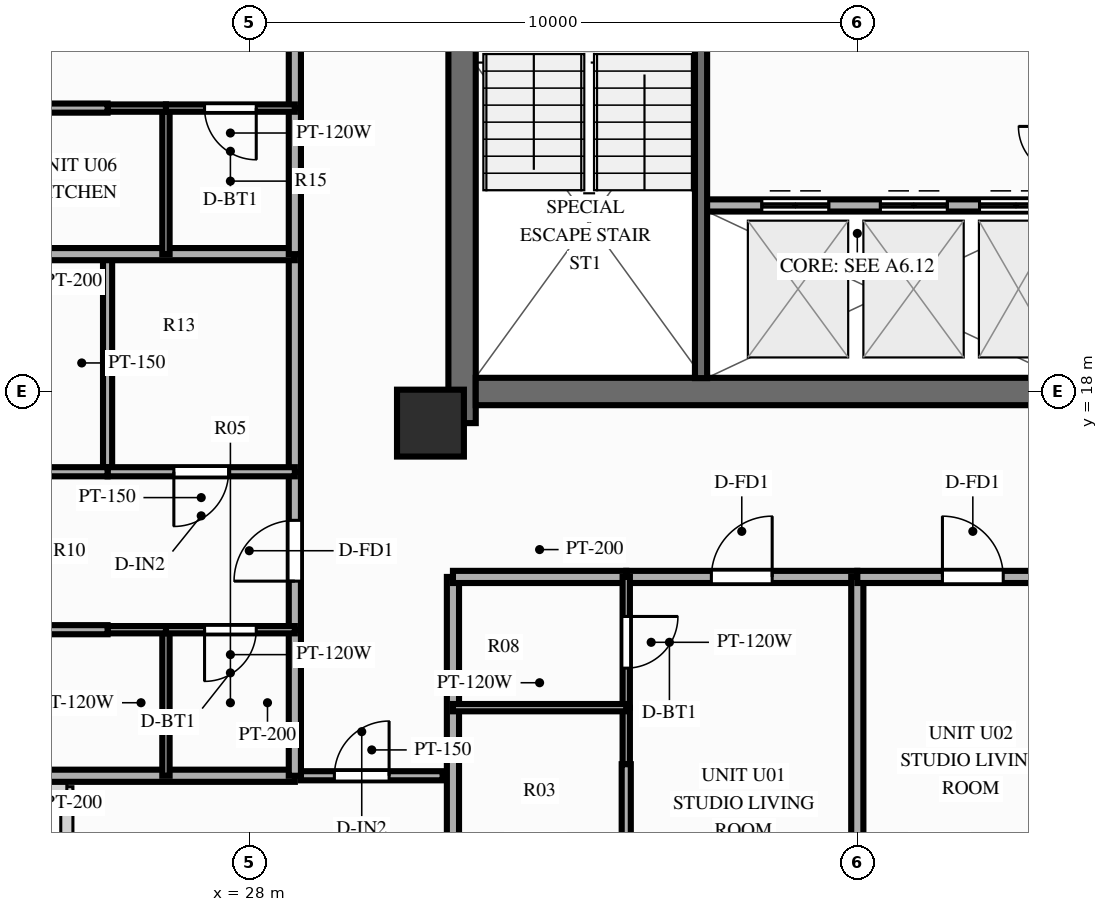
"""IFC4 building model, lengths in metres.
Left out: names, types, materials, properties, quantities, classifications, styles, units other than length and angle.
Written with IfcOpenShell. Run it as: python <this file> out.ifc"""

import sys

from ifc_helpers import new_model, si_unit, direction, frame, frame_2d, origin, origin_2d, place, context, subcontext, project, spatial, rectangle, extrude, source, transform, mapped, element, fill, save


model = new_model("IFC4")
c1 = context("Model", 3, precision=1e-05, world=origin(), true_north=direction((0.0, 1.0)))
c2 = subcontext(c1, "Body", "Model", "MODEL_VIEW")
j1 = project(units=[si_unit("LENGTHUNIT", "METRE"), si_unit("PLANEANGLEUNIT", "RADIAN")], contexts=[c1])
p1 = place(None, origin())
s1 = spatial("IfcSite", under=j1, at=p1, CompositionType="ELEMENT")
p2 = place(p1, origin())
s2 = spatial("IfcBuilding", under=s1, at=p2, CompositionType="ELEMENT")
p3 = place(p2, frame((0.0, 0.0, 196.6)))
s3 = spatial("IfcBuildingStorey", under=s2, at=p3, CompositionType="ELEMENT", Elevation=196.6)
p4 = place(p3, frame((31.5, 17.48, 0.0), z_axis=(0.0, 0.0, 1.0), x_axis=(0.0, 1.0, 0.0)))
e1 = element("IfcWall", 1, at=p4, inside=s3, PredefinedType="SHEAR", context=c2, shape_type="SweptSolid", body=[
    extrude(rectangle(XDim=19.04, YDim=0.45, at=frame_2d((9.52, 0.0))), origin(), (0.0, 0.0, 1.0), 3.0),
])
p5 = place(p4, frame((6.32, 0.0, 0.0)))
e2 = element("IfcOpeningElement", 2, at=p5, cuts=e1, PredefinedType="OPENING", context=c2, shape_type="SweptSolid", body=[
    extrude(rectangle(XDim=1.1, YDim=2.15, at=frame_2d((0.55, 1.075))), frame((0.0, 0.237, 0.0), z_axis=(0.0, -1.0, 0.0), x_axis=(1.0, 0.0, 0.0)), (0.0, 0.0, 1.0), 0.474),
])
p6 = place(p3, frame((31.725, 18.0, 0.0), z_axis=(0.0, 0.0, 1.0), x_axis=(1.0, 0.0, 0.0)))
e3 = element("IfcWall", 3, at=p6, inside=s3, PredefinedType="SHEAR", context=c2, shape_type="SweptSolid", body=[
    extrude(rectangle(XDim=12.55, YDim=0.45, at=frame_2d((6.275, 0.0))), origin(), (0.0, 0.0, 1.0), 3.0),
])
m1 = source(origin(), c2, "Body", "SweptSolid", [
    extrude(rectangle(XDim=1.1, YDim=1.1, at=origin_2d()), origin(), (0.0, 0.0, 1.0), 3.0),
])
p7 = place(p3, frame((30.98, 17.48, 0.0), z_axis=(0.0, 0.0, 1.0), x_axis=(1.0, 0.0, 0.0)))
e4 = element("IfcColumn", 4, at=p7, inside=s3, PredefinedType="COLUMN", context=c2, shape_type="MappedRepresentation", body=[
    mapped(m1, transform((0.0, 0.0, 0.0), scale=1.0)),
])
p8 = place(p3, frame((35.43, 21.06, 0.0), z_axis=(0.0, 0.0, 1.0), x_axis=(1.0, 0.0, 0.0)))
e5 = element("IfcWall", 5, at=p8, inside=s3, PredefinedType="PARTITIONING", context=c2, shape_type="SweptSolid", body=[
    extrude(rectangle(XDim=6.02, YDim=0.2, at=frame_2d((3.01, 0.0))), origin(), (0.0, 0.0, 1.0), 2.79),
])
p9 = place(p8, frame((1.0, 0.0, 0.0)))
e6 = element("IfcOpeningElement", 6, at=p9, cuts=e5, PredefinedType="OPENING", context=c2, shape_type="SweptSolid", body=[
    extrude(rectangle(XDim=1.1, YDim=2.15, at=frame_2d((0.55, 1.075))), frame((0.0, 0.112, 0.0), z_axis=(0.0, -1.0, 0.0), x_axis=(1.0, 0.0, 0.0)), (0.0, 0.0, 1.0), 0.224),
])
p10 = place(p8, frame((2.95, 0.0, 0.0)))
e7 = element("IfcOpeningElement", 7, at=p10, cuts=e5, PredefinedType="OPENING", context=c2, shape_type="SweptSolid", body=[
    extrude(rectangle(XDim=1.1, YDim=2.15, at=frame_2d((0.55, 1.075))), frame((0.0, 0.112, 0.0), z_axis=(0.0, -1.0, 0.0), x_axis=(1.0, 0.0, 0.0)), (0.0, 0.0, 1.0), 0.224),
])
p11 = place(p8, frame((4.58, 0.0, 0.0)))
e8 = element("IfcOpeningElement", 8, at=p11, cuts=e5, PredefinedType="OPENING", context=c2, shape_type="SweptSolid", body=[
    extrude(rectangle(XDim=1.2, YDim=2.15, at=frame_2d((0.6, 1.075))), frame((0.0, 0.112, 0.0), z_axis=(0.0, -1.0, 0.0), x_axis=(1.0, 0.0, 0.0)), (0.0, 0.0, 1.0), 0.224),
])
p12 = place(p3, frame((35.43, 18.22, 0.0), z_axis=(0.0, 0.0, 1.0), x_axis=(0.0, 1.0, 0.0)))
e9 = element("IfcWall", 9, at=p12, inside=s3, PredefinedType="SOLIDWALL", context=c2, shape_type="SweptSolid", body=[
    extrude(rectangle(XDim=7.22, YDim=0.2, at=frame_2d((3.61, 0.0))), origin(), (0.0, 0.0, 1.0), 2.79),
])
p13 = place(p12, frame((6.68, 0.0, 0.0), z_axis=(0.0, 0.0, 1.0), x_axis=(-1.0, 0.0, 0.0)))
e10 = element("IfcOpeningElement", 10, at=p13, cuts=e9, PredefinedType="OPENING", context=c2, shape_type="SweptSolid", body=[
    extrude(rectangle(XDim=1.1, YDim=2.15, at=frame_2d((0.55, 1.075))), frame((0.0, 0.112, 0.0), z_axis=(0.0, -1.0, 0.0), x_axis=(1.0, 0.0, 0.0)), (0.0, 0.0, 1.0), 0.224),
])
p14 = place(p3, frame((28.85, 11.68, 0.0), z_axis=(0.0, 0.0, 1.0), x_axis=(1.0, 0.0, 0.0)))
e11 = element("IfcWall", 11, at=p14, inside=s3, PredefinedType="PARTITIONING", context=c2, shape_type="SweptSolid", body=[
    extrude(rectangle(XDim=2.33, YDim=0.15, at=frame_2d((1.165, 0.0))), origin(), (0.0, 0.0, 1.0), 2.79),
])
p15 = place(p14, frame((0.55, 0.0, 0.0)))
e12 = element("IfcOpeningElement", 12, at=p15, cuts=e11, PredefinedType="OPENING", context=c2, shape_type="SweptSolid", body=[
    extrude(rectangle(XDim=0.9, YDim=2.1, at=frame_2d((0.45, 1.05))), frame((0.0, 0.087, 0.0), z_axis=(0.0, -1.0, 0.0), x_axis=(1.0, 0.0, 0.0)), (0.0, 0.0, 1.0), 0.174),
])
p16 = place(p3, frame((31.35, 14.95, 0.0), z_axis=(0.0, 0.0, 1.0), x_axis=(0.0, -1.0, 0.0)))
e13 = element("IfcWall", 13, at=p16, inside=s3, PredefinedType="PARTITIONING", context=c2, shape_type="SweptSolid", body=[
    extrude(rectangle(XDim=8.8, YDim=0.2, at=frame_2d((4.4, 0.0))), origin(), (0.0, 0.0, 1.0), 2.39),
])
p17 = place(p3, frame((31.35, 14.95, 0.0), z_axis=(0.0, 0.0, 1.0), x_axis=(1.0, 0.0, 0.0)))
e14 = element("IfcWall", 14, at=p17, inside=s3, PredefinedType="PARTITIONING", context=c2, shape_type="SweptSolid", body=[
    extrude(rectangle(XDim=2.85, YDim=0.2, at=frame_2d((1.425, 0.0))), origin(), (0.0, 0.0, 1.0), 2.79),
])
p18 = place(p3, frame((34.2, 14.95, 0.0), z_axis=(0.0, 0.0, 1.0), x_axis=(1.0, 0.0, 0.0)))
e15 = element("IfcWall", 15, at=p18, inside=s3, PredefinedType="PARTITIONING", context=c2, shape_type="SweptSolid", body=[
    extrude(rectangle(XDim=3.8, YDim=0.2, at=frame_2d((1.9, 0.0))), origin(), (0.0, 0.0, 1.0), 2.79),
])
p19 = place(p18, frame((1.4, 0.0, 0.0)))
e16 = element("IfcOpeningElement", 16, at=p19, cuts=e15, PredefinedType="OPENING", context=c2, shape_type="SweptSolid", body=[
    extrude(rectangle(XDim=1.0, YDim=2.15, at=frame_2d((0.5, 1.075))), frame((0.0, 0.112, 0.0), z_axis=(0.0, -1.0, 0.0), x_axis=(1.0, 0.0, 0.0)), (0.0, 0.0, 1.0), 0.224),
])
p20 = place(p3, frame((34.2, 14.95, 0.0), z_axis=(0.0, 0.0, 1.0), x_axis=(0.0, -1.0, 0.0)))
e17 = element("IfcWall", 17, at=p20, inside=s3, PredefinedType="PARTITIONING", context=c2, shape_type="SweptSolid", body=[
    extrude(rectangle(XDim=2.15, YDim=0.12, at=frame_2d((1.075, 0.0))), origin(), (0.0, 0.0, 1.0), 2.79),
])
p21 = place(p20, frame((0.65, 0.0, 0.0)))
e18 = element("IfcOpeningElement", 18, at=p21, cuts=e17, PredefinedType="OPENING", context=c2, shape_type="SweptSolid", body=[
    extrude(rectangle(XDim=0.85, YDim=2.05, at=frame_2d((0.425, 1.025))), frame((0.0, 0.072, 0.0), z_axis=(0.0, -1.0, 0.0), x_axis=(1.0, 0.0, 0.0)), (0.0, 0.0, 1.0), 0.144),
])
p22 = place(p3, frame((34.2, 12.8, 0.0), z_axis=(0.0, 0.0, 1.0), x_axis=(0.0, -1.0, 0.0)))
e19 = element("IfcWall", 19, at=p22, inside=s3, PredefinedType="PARTITIONING", context=c2, shape_type="SweptSolid", body=[
    extrude(rectangle(XDim=0.93, YDim=0.12, at=frame_2d((0.465, 0.0))), origin(), (0.0, 0.0, 1.0), 2.79),
])
p23 = place(p3, frame((31.35, 12.8, 0.0), z_axis=(0.0, 0.0, 1.0), x_axis=(1.0, 0.0, 0.0)))
e20 = element("IfcWall", 20, at=p23, inside=s3, PredefinedType="PARTITIONING", context=c2, shape_type="SweptSolid", body=[
    extrude(rectangle(XDim=2.85, YDim=0.12, at=frame_2d((1.425, 0.0))), origin(), (0.0, 0.0, 1.0), 2.79),
])
p24 = place(p3, frame((34.2, 11.87, 0.0), z_axis=(0.0, 0.0, 1.0), x_axis=(0.0, -1.0, 0.0)))
e21 = element("IfcWall", 21, at=p24, inside=s3, PredefinedType="PARTITIONING", context=c2, shape_type="SweptSolid", body=[
    extrude(rectangle(XDim=5.72, YDim=0.15, at=frame_2d((2.86, 0.0))), origin(), (0.0, 0.0, 1.0), 2.79),
])
p25 = place(p24, frame((2.229, 0.0, 0.0)))
e22 = element("IfcOpeningElement", 22, at=p25, cuts=e21, PredefinedType="OPENING", context=c2, shape_type="SweptSolid", body=[
    extrude(rectangle(XDim=0.9, YDim=2.1, at=frame_2d((0.45, 1.05))), frame((0.0, 0.087, 0.0), z_axis=(0.0, -1.0, 0.0), x_axis=(1.0, 0.0, 0.0)), (0.0, 0.0, 1.0), 0.174),
])
p26 = place(p3, frame((38.0, 14.95, 0.0), z_axis=(0.0, 0.0, 1.0), x_axis=(0.0, -1.0, 0.0)))
e23 = element("IfcWall", 23, at=p26, inside=s3, PredefinedType="PARTITIONING", context=c2, shape_type="SweptSolid", body=[
    extrude(rectangle(XDim=8.8, YDim=0.2, at=frame_2d((4.4, 0.0))), origin(), (0.0, 0.0, 1.0), 2.79),
])
p27 = place(p3, frame((38.0, 14.95, 0.0), z_axis=(0.0, 0.0, 1.0), x_axis=(1.0, 0.0, 0.0)))
e24 = element("IfcWall", 24, at=p27, inside=s3, PredefinedType="PARTITIONING", context=c2, shape_type="SweptSolid", body=[
    extrude(rectangle(XDim=3.8, YDim=0.2, at=frame_2d((1.9, 0.0))), origin(), (0.0, 0.0, 1.0), 2.79),
])
p28 = place(p27, frame((1.4, 0.0, 0.0)))
e25 = element("IfcOpeningElement", 25, at=p28, cuts=e24, PredefinedType="OPENING", context=c2, shape_type="SweptSolid", body=[
    extrude(rectangle(XDim=1.0, YDim=2.15, at=frame_2d((0.5, 1.075))), frame((0.0, 0.112, 0.0), z_axis=(0.0, -1.0, 0.0), x_axis=(1.0, 0.0, 0.0)), (0.0, 0.0, 1.0), 0.224),
])
p29 = place(p3, frame((28.75, 11.68, 0.0), z_axis=(0.0, 0.0, 1.0), x_axis=(-1.0, 0.0, 0.0)))
e26 = element("IfcWall", 26, at=p29, inside=s3, PredefinedType="PARTITIONING", context=c2, shape_type="SweptSolid", body=[
    extrude(rectangle(XDim=9.1, YDim=0.2, at=frame_2d((4.55, 0.0))), origin(), (0.0, 0.0, 1.0), 2.79),
])
p30 = place(p3, frame((28.75, 11.68, 0.0), z_axis=(0.0, 0.0, 1.0), x_axis=(0.0, 1.0, 0.0)))
e27 = element("IfcWall", 27, at=p30, inside=s3, PredefinedType="PARTITIONING", context=c2, shape_type="SweptSolid", body=[
    extrude(rectangle(XDim=2.402, YDim=0.2, at=frame_2d((1.201, 0.0))), origin(), (0.0, 0.0, 1.0), 2.79),
])
p31 = place(p3, frame((28.75, 14.082, 0.0), z_axis=(0.0, 0.0, 1.0), x_axis=(0.0, 1.0, 0.0)))
e28 = element("IfcWall", 28, at=p31, inside=s3, PredefinedType="PARTITIONING", context=c2, shape_type="SweptSolid", body=[
    extrude(rectangle(XDim=2.598, YDim=0.2, at=frame_2d((1.299, 0.0))), origin(), (0.0, 0.0, 1.0), 2.79),
])
p32 = place(p31, frame((0.799, 0.0, 0.0)))
e29 = element("IfcOpeningElement", 29, at=p32, cuts=e28, PredefinedType="OPENING", context=c2, shape_type="SweptSolid", body=[
    extrude(rectangle(XDim=1.0, YDim=2.15, at=frame_2d((0.5, 1.075))), frame((0.0, 0.112, 0.0), z_axis=(0.0, -1.0, 0.0), x_axis=(1.0, 0.0, 0.0)), (0.0, 0.0, 1.0), 0.224),
])
p33 = place(p3, frame((28.75, 16.68, 0.0), z_axis=(0.0, 0.0, 1.0), x_axis=(0.0, 1.0, 0.0)))
e30 = element("IfcWall", 30, at=p33, inside=s3, PredefinedType="PARTITIONING", context=c2, shape_type="SweptSolid", body=[
    extrude(rectangle(XDim=3.579, YDim=0.2, at=frame_2d((1.79, 0.0))), origin(), (0.0, 0.0, 1.0), 2.79),
])
p34 = place(p3, frame((26.63, 11.68, 0.0), z_axis=(0.0, 0.0, 1.0), x_axis=(0.0, 1.0, 0.0)))
e31 = element("IfcWall", 31, at=p34, inside=s3, PredefinedType="PARTITIONING", context=c2, shape_type="SweptSolid", body=[
    extrude(rectangle(XDim=2.402, YDim=0.12, at=frame_2d((1.201, 0.0))), origin(), (0.0, 0.0, 1.0), 2.79),
])
p35 = place(p3, frame((25.67, 16.68, 0.0), z_axis=(0.0, 0.0, 1.0), x_axis=(0.0, 1.0, 0.0)))
e32 = element("IfcWall", 32, at=p35, inside=s3, PredefinedType="PARTITIONING", context=c2, shape_type="SweptSolid", body=[
    extrude(rectangle(XDim=3.579, YDim=0.15, at=frame_2d((1.79, 0.0))), origin(), (0.0, 0.0, 1.0), 2.49),
])
p36 = place(p3, frame((28.75, 14.082, 0.0), z_axis=(0.0, 0.0, 1.0), x_axis=(-1.0, 0.0, 0.0)))
e33 = element("IfcWall", 33, at=p36, inside=s3, PredefinedType="PARTITIONING", context=c2, shape_type="SweptSolid", body=[
    extrude(rectangle(XDim=2.12, YDim=0.12, at=frame_2d((1.06, 0.0))), origin(), (0.0, 0.0, 1.0), 2.79),
])
p37 = place(p36, frame((0.635, 0.0, 0.0)))
e34 = element("IfcOpeningElement", 34, at=p37, cuts=e33, PredefinedType="OPENING", context=c2, shape_type="SweptSolid", body=[
    extrude(rectangle(XDim=0.85, YDim=2.05, at=frame_2d((0.425, 1.025))), frame((0.0, 0.072, 0.0), z_axis=(0.0, -1.0, 0.0), x_axis=(1.0, 0.0, 0.0)), (0.0, 0.0, 1.0), 0.144),
])
p38 = place(p3, frame((26.63, 14.082, 0.0), z_axis=(0.0, 0.0, 1.0), x_axis=(-1.0, 0.0, 0.0)))
e35 = element("IfcWall", 35, at=p38, inside=s3, PredefinedType="PARTITIONING", context=c2, shape_type="SweptSolid", body=[
    extrude(rectangle(XDim=0.96, YDim=0.12, at=frame_2d((0.48, 0.0))), origin(), (0.0, 0.0, 1.0), 2.79),
])
p39 = place(p3, frame((25.67, 14.082, 0.0), z_axis=(0.0, 0.0, 1.0), x_axis=(-1.0, 0.0, 0.0)))
e36 = element("IfcWall", 36, at=p39, inside=s3, PredefinedType="PARTITIONING", context=c2, shape_type="SweptSolid", body=[
    extrude(rectangle(XDim=6.02, YDim=0.15, at=frame_2d((3.01, 0.0))), origin(), (0.0, 0.0, 1.0), 2.79),
])
p40 = place(p39, frame((2.367, 0.0, 0.0)))
e37 = element("IfcOpeningElement", 37, at=p40, cuts=e36, PredefinedType="OPENING", context=c2, shape_type="SweptSolid", body=[
    extrude(rectangle(XDim=0.9, YDim=2.1, at=frame_2d((0.45, 1.05))), frame((0.0, 0.087, 0.0), z_axis=(0.0, -1.0, 0.0), x_axis=(1.0, 0.0, 0.0)), (0.0, 0.0, 1.0), 0.174),
])
p41 = place(p3, frame((28.75, 16.68, 0.0), z_axis=(0.0, 0.0, 1.0), x_axis=(-1.0, 0.0, 0.0)))
e38 = element("IfcWall", 38, at=p41, inside=s3, PredefinedType="PARTITIONING", context=c2, shape_type="SweptSolid", body=[
    extrude(rectangle(XDim=3.08, YDim=0.15, at=frame_2d((1.54, 0.0))), origin(), (0.0, 0.0, 1.0), 2.79),
])
p42 = place(p41, frame((1.09, 0.0, 0.0)))
e39 = element("IfcOpeningElement", 39, at=p42, cuts=e38, PredefinedType="OPENING", context=c2, shape_type="SweptSolid", body=[
    extrude(rectangle(XDim=0.9, YDim=2.1, at=frame_2d((0.45, 1.05))), frame((0.0, 0.087, 0.0), z_axis=(0.0, -1.0, 0.0), x_axis=(1.0, 0.0, 0.0)), (0.0, 0.0, 1.0), 0.174),
])
p43 = place(p3, frame((25.67, 16.68, 0.0), z_axis=(0.0, 0.0, 1.0), x_axis=(-1.0, 0.0, 0.0)))
e40 = element("IfcWall", 40, at=p43, inside=s3, PredefinedType="PARTITIONING", context=c2, shape_type="SweptSolid", body=[
    extrude(rectangle(XDim=6.02, YDim=0.15, at=frame_2d((3.01, 0.0))), origin(), (0.0, 0.0, 1.0), 2.79),
])
p44 = place(p43, frame((2.367, 0.0, 0.0)))
e41 = element("IfcOpeningElement", 41, at=p44, cuts=e40, PredefinedType="OPENING", context=c2, shape_type="SweptSolid", body=[
    extrude(rectangle(XDim=0.9, YDim=2.1, at=frame_2d((0.45, 1.05))), frame((0.0, 0.087, 0.0), z_axis=(0.0, -1.0, 0.0), x_axis=(1.0, 0.0, 0.0)), (0.0, 0.0, 1.0), 0.174),
])
p45 = place(p3, frame((28.75, 20.259, 0.0), z_axis=(0.0, 0.0, 1.0), x_axis=(-1.0, 0.0, 0.0)))
e42 = element("IfcWall", 42, at=p45, inside=s3, PredefinedType="PARTITIONING", context=c2, shape_type="SweptSolid", body=[
    extrude(rectangle(XDim=9.1, YDim=0.2, at=frame_2d((4.55, 0.0))), origin(), (0.0, 0.0, 1.0), 2.79),
])
p46 = place(p3, frame((28.75, 20.259, 0.0), z_axis=(0.0, 0.0, 1.0), x_axis=(0.0, 1.0, 0.0)))
e43 = element("IfcWall", 43, at=p46, inside=s3, PredefinedType="PARTITIONING", context=c2, shape_type="SweptSolid", body=[
    extrude(rectangle(XDim=2.402, YDim=0.2, at=frame_2d((1.201, 0.0))), origin(), (0.0, 0.0, 1.0), 2.79),
])
p47 = place(p3, frame((28.75, 22.661, 0.0), z_axis=(0.0, 0.0, 1.0), x_axis=(0.0, 1.0, 0.0)))
e44 = element("IfcWall", 44, at=p47, inside=s3, PredefinedType="PARTITIONING", context=c2, shape_type="SweptSolid", body=[
    extrude(rectangle(XDim=2.917, YDim=0.2, at=frame_2d((1.458, 0.0))), origin(), (0.0, 0.0, 1.0), 2.79),
])
p48 = place(p47, frame((0.958, 0.0, 0.0)))
e45 = element("IfcOpeningElement", 45, at=p48, cuts=e44, PredefinedType="OPENING", context=c2, shape_type="SweptSolid", body=[
    extrude(rectangle(XDim=1.0, YDim=2.15, at=frame_2d((0.5, 1.075))), frame((0.0, 0.112, 0.0), z_axis=(0.0, -1.0, 0.0), x_axis=(1.0, 0.0, 0.0)), (0.0, 0.0, 1.0), 0.224),
])
p49 = place(p3, frame((26.63, 20.259, 0.0), z_axis=(0.0, 0.0, 1.0), x_axis=(0.0, 1.0, 0.0)))
e46 = element("IfcWall", 46, at=p49, inside=s3, PredefinedType="PARTITIONING", context=c2, shape_type="SweptSolid", body=[
    extrude(rectangle(XDim=2.402, YDim=0.12, at=frame_2d((1.201, 0.0))), origin(), (0.0, 0.0, 1.0), 2.79),
])
p50 = place(p3, frame((28.75, 22.661, 0.0), z_axis=(0.0, 0.0, 1.0), x_axis=(-1.0, 0.0, 0.0)))
e47 = element("IfcWall", 47, at=p50, inside=s3, PredefinedType="PARTITIONING", context=c2, shape_type="SweptSolid", body=[
    extrude(rectangle(XDim=2.12, YDim=0.12, at=frame_2d((1.06, 0.0))), origin(), (0.0, 0.0, 1.0), 2.79),
])
p51 = place(p50, frame((0.635, 0.0, 0.0)))
e48 = element("IfcOpeningElement", 48, at=p51, cuts=e47, PredefinedType="OPENING", context=c2, shape_type="SweptSolid", body=[
    extrude(rectangle(XDim=0.85, YDim=2.05, at=frame_2d((0.425, 1.025))), frame((0.0, 0.072, 0.0), z_axis=(0.0, -1.0, 0.0), x_axis=(1.0, 0.0, 0.0)), (0.0, 0.0, 1.0), 0.144),
])
p52 = place(p3, frame((26.63, 22.661, 0.0), z_axis=(0.0, 0.0, 1.0), x_axis=(-1.0, 0.0, 0.0)))
e49 = element("IfcWall", 49, at=p52, inside=s3, PredefinedType="PARTITIONING", context=c2, shape_type="SweptSolid", body=[
    extrude(rectangle(XDim=0.96, YDim=0.12, at=frame_2d((0.48, 0.0))), origin(), (0.0, 0.0, 1.0), 2.79),
])
p53 = place(p3, frame((25.67, 22.661, 0.0), z_axis=(0.0, 0.0, 1.0), x_axis=(-1.0, 0.0, 0.0)))
e50 = element("IfcWall", 50, at=p53, inside=s3, PredefinedType="PARTITIONING", context=c2, shape_type="SweptSolid", body=[
    extrude(rectangle(XDim=6.02, YDim=0.15, at=frame_2d((3.01, 0.0))), origin(), (0.0, 0.0, 1.0), 2.79),
])
p54 = place(p53, frame((2.367, 0.0, 0.0)))
e51 = element("IfcOpeningElement", 51, at=p54, cuts=e50, PredefinedType="OPENING", context=c2, shape_type="SweptSolid", body=[
    extrude(rectangle(XDim=0.9, YDim=2.1, at=frame_2d((0.45, 1.05))), frame((0.0, 0.087, 0.0), z_axis=(0.0, -1.0, 0.0), x_axis=(1.0, 0.0, 0.0)), (0.0, 0.0, 1.0), 0.174),
])
m2 = source(origin(), c2, "Body", "SweptSolid", [
    extrude(rectangle(XDim=1.1, YDim=2.15, at=frame_2d((0.55, 1.075))), frame((0.0, 0.025, 0.0), z_axis=(0.0, -1.0, 0.0), x_axis=(1.0, 0.0, 0.0)), (0.0, 0.0, 1.0), 0.05),
])
p55 = place(p9, origin())
e52 = element("IfcDoor", 52, at=p55, inside=s3, OperationType="DOUBLE_DOOR_SLIDING", PredefinedType="DOOR", context=c2, shape_type="MappedRepresentation", body=[
    mapped(m2, transform((0.0, 0.0, 0.0), scale=1.0)),
])
fill(e6, e52)
p56 = place(p10, origin())
e53 = element("IfcDoor", 53, at=p56, inside=s3, OperationType="DOUBLE_DOOR_SLIDING", PredefinedType="DOOR", context=c2, shape_type="MappedRepresentation", body=[
    mapped(m2, transform((0.0, 0.0, 0.0), scale=1.0)),
])
fill(e7, e53)
m3 = source(origin(), c2, "Body", "SweptSolid", [
    extrude(rectangle(XDim=1.2, YDim=2.15, at=frame_2d((0.6, 1.075))), frame((0.0, 0.025, 0.0), z_axis=(0.0, -1.0, 0.0), x_axis=(1.0, 0.0, 0.0)), (0.0, 0.0, 1.0), 0.05),
])
p57 = place(p11, origin())
e54 = element("IfcDoor", 54, at=p57, inside=s3, OperationType="DOUBLE_DOOR_SLIDING", PredefinedType="DOOR", context=c2, shape_type="MappedRepresentation", body=[
    mapped(m3, transform((0.0, 0.0, 0.0), scale=1.0)),
])
fill(e8, e54)
m4 = source(origin(), c2, "Body", "SweptSolid", [
    extrude(rectangle(XDim=0.9, YDim=2.1, at=frame_2d((0.45, 1.05))), frame((0.0, 0.025, 0.0), z_axis=(0.0, -1.0, 0.0), x_axis=(1.0, 0.0, 0.0)), (0.0, 0.0, 1.0), 0.05),
])
p58 = place(p15, origin())
e55 = element("IfcDoor", 55, at=p58, inside=s3, OperationType="SINGLE_SWING_RIGHT", PredefinedType="DOOR", context=c2, shape_type="MappedRepresentation", body=[
    mapped(m4, transform((0.0, 0.0, 0.0), scale=1.0)),
])
fill(e12, e55)
m5 = source(origin(), c2, "Body", "SweptSolid", [
    extrude(rectangle(XDim=1.0, YDim=2.15, at=frame_2d((0.5, 1.075))), frame((0.0, 0.025, 0.0), z_axis=(0.0, -1.0, 0.0), x_axis=(1.0, 0.0, 0.0)), (0.0, 0.0, 1.0), 0.05),
])
p59 = place(p19, origin())
e56 = element("IfcDoor", 56, at=p59, inside=s3, OperationType="SINGLE_SWING_RIGHT", PredefinedType="DOOR", context=c2, shape_type="MappedRepresentation", body=[
    mapped(m5, transform((0.0, 0.0, 0.0), scale=1.0)),
])
fill(e16, e56)
m6 = source(origin(), c2, "Body", "SweptSolid", [
    extrude(rectangle(XDim=0.85, YDim=2.05, at=frame_2d((0.425, 1.025))), frame((0.0, 0.025, 0.0), z_axis=(0.0, -1.0, 0.0), x_axis=(1.0, 0.0, 0.0)), (0.0, 0.0, 1.0), 0.05),
])
p60 = place(p21, origin())
e57 = element("IfcDoor", 57, at=p60, inside=s3, OperationType="SINGLE_SWING_LEFT", PredefinedType="DOOR", context=c2, shape_type="MappedRepresentation", body=[
    mapped(m6, transform((0.0, 0.0, 0.0), scale=1.0)),
])
fill(e18, e57)
p61 = place(p28, origin())
e58 = element("IfcDoor", 58, at=p61, inside=s3, OperationType="SINGLE_SWING_LEFT", PredefinedType="DOOR", context=c2, shape_type="MappedRepresentation", body=[
    mapped(m5, transform((0.0, 0.0, 0.0), scale=1.0)),
])
fill(e25, e58)
p62 = place(p32, origin())
e59 = element("IfcDoor", 59, at=p62, inside=s3, OperationType="SINGLE_SWING_LEFT", PredefinedType="DOOR", context=c2, shape_type="MappedRepresentation", body=[
    mapped(m5, transform((0.0, 0.0, 0.0), scale=1.0)),
])
fill(e29, e59)
p63 = place(p37, origin())
e60 = element("IfcDoor", 60, at=p63, inside=s3, OperationType="SINGLE_SWING_RIGHT", PredefinedType="DOOR", context=c2, shape_type="MappedRepresentation", body=[
    mapped(m6, transform((0.0, 0.0, 0.0), scale=1.0)),
])
fill(e34, e60)
p64 = place(p42, origin())
e61 = element("IfcDoor", 61, at=p64, inside=s3, OperationType="SINGLE_SWING_RIGHT", PredefinedType="DOOR", context=c2, shape_type="MappedRepresentation", body=[
    mapped(m4, transform((0.0, 0.0, 0.0), scale=1.0)),
])
fill(e39, e61)
p65 = place(p51, origin())
e62 = element("IfcDoor", 62, at=p65, inside=s3, OperationType="SINGLE_SWING_LEFT", PredefinedType="DOOR", context=c2, shape_type="MappedRepresentation", body=[
    mapped(m6, transform((0.0, 0.0, 0.0), scale=1.0)),
])
fill(e48, e62)
save(model, sys.argv[1])
